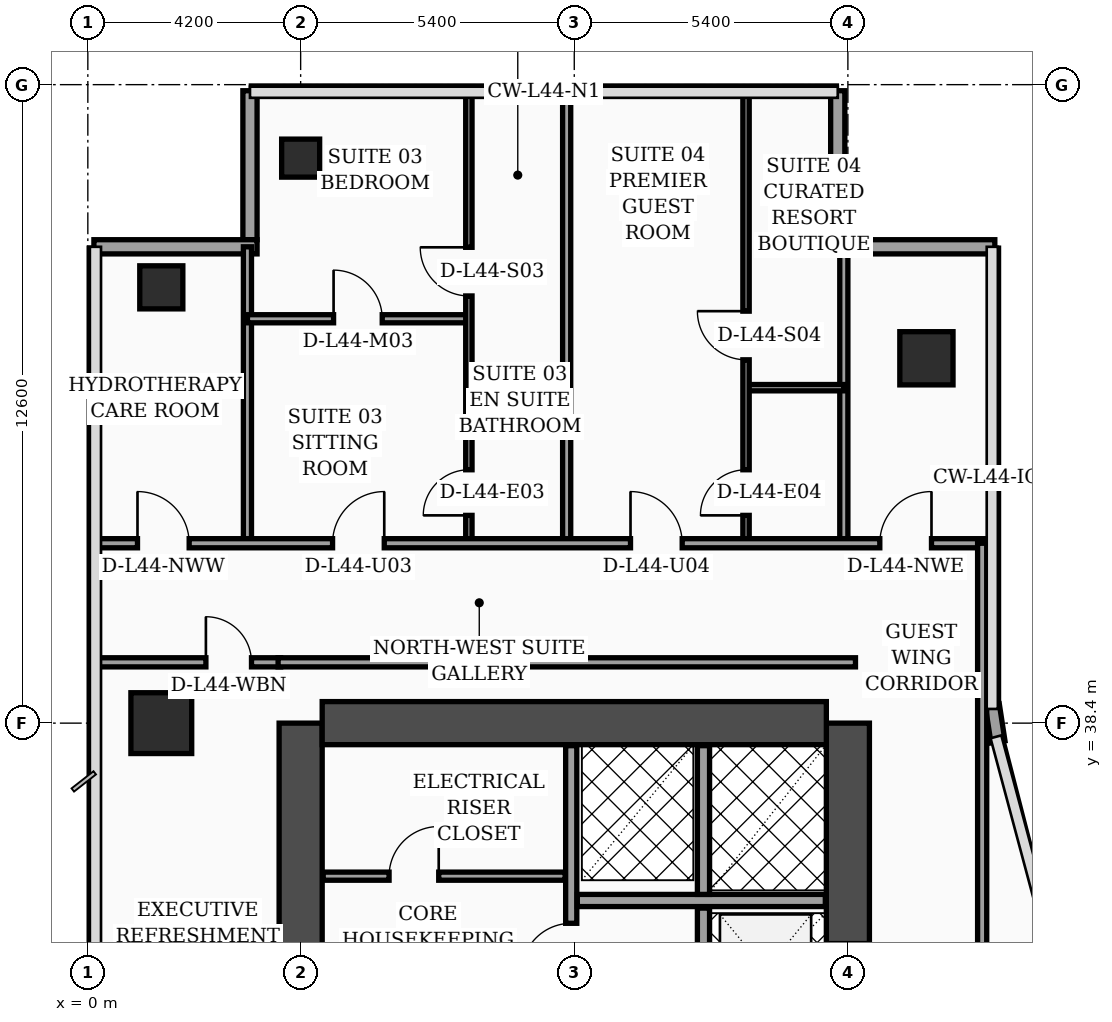
"""IFC4 building model, lengths in metres.
Left out: names, types, materials, properties, quantities, classifications, styles, units other than length and angle.
Written with IfcOpenShell. Run it as: python <this file> out.ifc"""

import sys

from ifc_helpers import new_model, si_unit, direction, frame, frame_2d, origin, origin_2d, place, context, subcontext, project, spatial, rectangle, hollow_rectangle, extrude, element, fill, save


model = new_model("IFC4")
c1 = context("Model", 3, precision=1e-05, world=origin(), true_north=direction((0.0, 1.0)))
c2 = subcontext(c1, "Body", "Model", "MODEL_VIEW")
j1 = project(units=[si_unit("LENGTHUNIT", "METRE"), si_unit("PLANEANGLEUNIT", "RADIAN")], contexts=[c1])
p1 = place(None, origin())
s1 = spatial("IfcSite", under=j1, at=p1, CompositionType="ELEMENT")
p2 = place(p1, origin())
s2 = spatial("IfcBuilding", under=s1, at=p2, CompositionType="ELEMENT")
p3 = place(p2, frame((0.0, 0.0, 178.9)))
s3 = spatial("IfcBuildingStorey", under=s2, at=p3, CompositionType="ELEMENT", Elevation=178.9)
p4 = place(p3, frame((4.2, 16.8, 0.0), z_axis=(0.0, 0.0, 1.0), x_axis=(0.0, 1.0, 0.0)))
e1 = element("IfcWall", 1, at=p4, inside=s3, PredefinedType="SHEAR", context=c2, shape_type="SweptSolid", body=[
    extrude(rectangle(XDim=21.6, YDim=0.85, at=frame_2d((10.8, 0.0))), origin(), (0.0, 0.0, 1.0), 3.56),
])
p5 = place(p3, frame((15.0, 16.8, 0.0), z_axis=(0.0, 0.0, 1.0), x_axis=(0.0, 1.0, 0.0)))
e2 = element("IfcWall", 2, at=p5, inside=s3, PredefinedType="SHEAR", context=c2, shape_type="SweptSolid", body=[
    extrude(rectangle(XDim=21.6, YDim=0.85, at=frame_2d((10.8, 0.0))), origin(), (0.0, 0.0, 1.0), 3.56),
])
p6 = place(p5, frame((8.65, 0.0, 0.0)))
e3 = element("IfcOpeningElement", 3, at=p6, cuts=e2, PredefinedType="OPENING", context=c2, shape_type="SweptSolid", body=[
    extrude(rectangle(XDim=1.1, YDim=2.2, at=frame_2d((0.55, 1.1))), frame((0.0, 0.435, 0.0), z_axis=(0.0, -1.0, 0.0), x_axis=(1.0, 0.0, 0.0)), (0.0, 0.0, 1.0), 0.87),
])
p7 = place(p5, frame((10.85, 0.0, 0.0)))
e4 = element("IfcOpeningElement", 4, at=p7, cuts=e2, PredefinedType="OPENING", context=c2, shape_type="SweptSolid", body=[
    extrude(rectangle(XDim=1.1, YDim=2.2, at=frame_2d((0.55, 1.1))), frame((0.0, 0.435, 0.0), z_axis=(0.0, -1.0, 0.0), x_axis=(1.0, 0.0, 0.0)), (0.0, 0.0, 1.0), 0.87),
])
p8 = place(p5, frame((13.5, 0.0, 0.0)))
e5 = element("IfcOpeningElement", 5, at=p8, cuts=e2, PredefinedType="OPENING", context=c2, shape_type="SweptSolid", body=[
    extrude(rectangle(XDim=1.1, YDim=2.2, at=frame_2d((0.55, 1.1))), frame((0.0, 0.435, 0.0), z_axis=(0.0, -1.0, 0.0), x_axis=(1.0, 0.0, 0.0)), (0.0, 0.0, 1.0), 0.87),
])
p9 = place(p5, frame((16.15, 0.0, 0.0)))
e6 = element("IfcOpeningElement", 6, at=p9, cuts=e2, PredefinedType="OPENING", context=c2, shape_type="SweptSolid", body=[
    extrude(rectangle(XDim=1.1, YDim=2.2, at=frame_2d((0.55, 1.1))), frame((0.0, 0.435, 0.0), z_axis=(0.0, -1.0, 0.0), x_axis=(1.0, 0.0, 0.0)), (0.0, 0.0, 1.0), 0.87),
])
p10 = place(p3, frame((4.625, 38.4, 0.0), z_axis=(0.0, 0.0, 1.0), x_axis=(1.0, 0.0, 0.0)))
e7 = element("IfcWall", 7, at=p10, inside=s3, PredefinedType="SHEAR", context=c2, shape_type="SweptSolid", body=[
    extrude(rectangle(XDim=9.95, YDim=0.85, at=frame_2d((4.975, 0.0))), origin(), (0.0, 0.0, 1.0), 3.56),
])
p11 = place(p3, frame((1.45, 38.4, 0.0), z_axis=(0.0, 0.0, 1.0), x_axis=(1.0, 0.0, 0.0)))
e8 = element("IfcColumn", 8, at=p11, inside=s3, PredefinedType="COLUMN", context=c2, shape_type="SweptSolid", body=[
    extrude(rectangle(XDim=1.2, YDim=1.2, at=origin_2d()), origin(), (0.0, 0.0, 1.0), 3.56),
])
p12 = place(p3, frame((1.45, 47.0, 0.0), z_axis=(0.0, 0.0, 1.0), x_axis=(1.0, 0.0, 0.0)))
e9 = element("IfcColumn", 9, at=p12, inside=s3, PredefinedType="COLUMN", context=c2, shape_type="SweptSolid", body=[
    extrude(hollow_rectangle(XDim=0.85, YDim=0.85, WallThickness=0.036, at=origin_2d()), origin(), (0.0, 0.0, 1.0), 3.56),
])
p13 = place(p3, frame((4.2, 49.55, 0.0), z_axis=(0.0, 0.0, 1.0), x_axis=(1.0, 0.0, 0.0)))
e10 = element("IfcColumn", 10, at=p13, inside=s3, PredefinedType="COLUMN", context=c2, shape_type="SweptSolid", body=[
    extrude(hollow_rectangle(XDim=0.75, YDim=0.75, WallThickness=0.032, at=origin_2d()), origin(), (0.0, 0.0, 1.0), 3.56),
])
p14 = place(p3, frame((16.55, 45.6, 0.0), z_axis=(0.0, 0.0, 1.0), x_axis=(1.0, 0.0, 0.0)))
e11 = element("IfcColumn", 11, at=p14, inside=s3, PredefinedType="COLUMN", context=c2, shape_type="SweptSolid", body=[
    extrude(rectangle(XDim=1.05, YDim=1.05, at=origin_2d()), origin(), (0.0, 0.0, 1.0), 3.56),
])
p15 = place(p3, frame((17.962, 38.03, 0.0), z_axis=(0.0, 0.0, 1.0), x_axis=(-0.15141125477, 0.988470855377, 0.0)))
e12 = element("IfcWall", 12, at=p15, inside=s3, PredefinedType="SOLIDWALL", context=c2, shape_type="SweptSolid", body=[
    extrude(rectangle(XDim=0.739, YDim=0.28, at=frame_2d((0.369, 0.0))), origin(), (0.0, 0.0, 1.0), 3.56),
])
p16 = place(p3, frame((17.9, 47.8, 0.0), z_axis=(0.0, 0.0, 1.0), x_axis=(-1.0, 0.0, 0.0)))
e13 = element("IfcWall", 13, at=p16, inside=s3, PredefinedType="SOLIDWALL", context=c2, shape_type="SweptSolid", body=[
    extrude(rectangle(XDim=3.24, YDim=0.28, at=frame_2d((1.62, 0.0))), origin(), (0.0, 0.0, 1.0), 3.56),
])
p17 = place(p3, frame((14.8, 47.94, 0.0), z_axis=(0.0, 0.0, 1.0), x_axis=(0.0, 1.0, 0.0)))
e14 = element("IfcWall", 14, at=p17, inside=s3, PredefinedType="SOLIDWALL", context=c2, shape_type="SweptSolid", body=[
    extrude(rectangle(XDim=2.94, YDim=0.28, at=frame_2d((1.47, 0.0))), origin(), (0.0, 0.0, 1.0), 3.56),
])
p18 = place(p3, frame((3.2, 50.88, 0.0), z_axis=(0.0, 0.0, 1.0), x_axis=(0.0, -1.0, 0.0)))
e15 = element("IfcWall", 15, at=p18, inside=s3, PredefinedType="SOLIDWALL", context=c2, shape_type="SweptSolid", body=[
    extrude(rectangle(XDim=2.94, YDim=0.28, at=frame_2d((1.47, 0.0))), origin(), (0.0, 0.0, 1.0), 3.04),
])
p19 = place(p3, frame((3.34, 47.8, 0.0), z_axis=(0.0, 0.0, 1.0), x_axis=(-1.0, 0.0, 0.0)))
e16 = element("IfcWall", 16, at=p19, inside=s3, PredefinedType="SOLIDWALL", context=c2, shape_type="SweptSolid", body=[
    extrude(rectangle(XDim=3.22, YDim=0.28, at=frame_2d((1.61, 0.0))), origin(), (0.0, 0.0, 1.0), 3.04),
])
p20 = place(p3, frame((4.645, 35.38, 0.0), z_axis=(0.0, 0.0, 1.0), x_axis=(1.0, 0.0, 0.0)))
e17 = element("IfcWall", 17, at=p20, inside=s3, PredefinedType="PARTITIONING", context=c2, shape_type="SweptSolid", body=[
    extrude(rectangle(XDim=4.775, YDim=0.16, at=frame_2d((2.387, 0.0))), origin(), (0.0, 0.0, 1.0), 3.56),
])
p21 = place(p20, frame((1.3, 0.0, 0.0)))
e18 = element("IfcOpeningElement", 18, at=p21, cuts=e17, PredefinedType="OPENING", context=c2, shape_type="SweptSolid", body=[
    extrude(rectangle(XDim=0.98, YDim=2.15, at=frame_2d((0.49, 1.075))), frame((0.0, 0.09, 0.0), z_axis=(0.0, -1.0, 0.0), x_axis=(1.0, 0.0, 0.0)), (0.0, 0.0, 1.0), 0.18),
])
p22 = place(p3, frame((9.54, 32.92, 0.0), z_axis=(0.0, 0.0, 1.0), x_axis=(0.0, 1.0, 0.0)))
e19 = element("IfcWall", 19, at=p22, inside=s3, PredefinedType="SOLIDWALL", context=c2, shape_type="SweptSolid", body=[
    extrude(rectangle(XDim=5.035, YDim=0.22, at=frame_2d((2.518, 0.0))), origin(), (0.0, 0.0, 1.0), 3.56),
])
p23 = place(p22, frame((0.55, 0.0, 0.0)))
e20 = element("IfcOpeningElement", 20, at=p23, cuts=e19, PredefinedType="OPENING", context=c2, shape_type="SweptSolid", body=[
    extrude(rectangle(XDim=0.98, YDim=2.15, at=frame_2d((0.49, 1.075))), frame((0.0, 0.12, 0.0), z_axis=(0.0, -1.0, 0.0), x_axis=(1.0, 0.0, 0.0)), (0.0, 0.0, 1.0), 0.24),
])
p24 = place(p3, frame((12.15, 27.0, 0.0), z_axis=(0.0, 0.0, 1.0), x_axis=(0.0, 1.0, 0.0)))
e21 = element("IfcWall", 21, at=p24, inside=s3, PredefinedType="SOLIDWALL", context=c2, shape_type="SweptSolid", body=[
    extrude(rectangle(XDim=7.75, YDim=0.24, at=frame_2d((3.875, 0.0))), origin(), (0.0, 0.0, 1.0), 3.56),
])
p25 = place(p3, frame((9.66, 34.9, 0.0), z_axis=(0.0, 0.0, 1.0), x_axis=(1.0, 0.0, 0.0)))
e22 = element("IfcWall", 22, at=p25, inside=s3, PredefinedType="SOLIDWALL", context=c2, shape_type="SweptSolid", body=[
    extrude(rectangle(XDim=4.895, YDim=0.24, at=frame_2d((2.448, 0.0))), origin(), (0.0, 0.0, 1.0), 3.56),
])
p26 = place(p3, frame((12.15, 35.02, 0.0), z_axis=(0.0, 0.0, 1.0), x_axis=(0.0, 1.0, 0.0)))
e23 = element("IfcWall", 23, at=p26, inside=s3, PredefinedType="SOLIDWALL", context=c2, shape_type="SweptSolid", body=[
    extrude(rectangle(XDim=2.935, YDim=0.24, at=frame_2d((1.468, 0.0))), origin(), (0.0, 0.0, 1.0), 3.56),
])
p27 = place(p3, frame((0.08, 39.6, 0.0), z_axis=(0.0, 0.0, 1.0), x_axis=(1.0, 0.0, 0.0)))
e24 = element("IfcWall", 24, at=p27, inside=s3, PredefinedType="PARTITIONING", context=c2, shape_type="SweptSolid", body=[
    extrude(rectangle(XDim=3.725, YDim=0.18, at=frame_2d((1.862, 0.0))), origin(), (0.0, 0.0, 1.0), 2.94),
])
p28 = place(p27, frame((2.25, 0.0, 0.0)))
e25 = element("IfcOpeningElement", 25, at=p28, cuts=e24, PredefinedType="OPENING", context=c2, shape_type="SweptSolid", body=[
    extrude(rectangle(XDim=0.9, YDim=2.15, at=frame_2d((0.45, 1.075))), frame((0.0, 0.1, 0.0), z_axis=(0.0, -1.0, 0.0), x_axis=(1.0, 0.0, 0.0)), (0.0, 0.0, 1.0), 0.2),
])
p29 = place(p3, frame((3.15, 41.95, 0.0), z_axis=(0.0, 0.0, 1.0), x_axis=(0.0, 1.0, 0.0)))
e26 = element("IfcWall", 26, at=p29, inside=s3, PredefinedType="PARTITIONING", context=c2, shape_type="SweptSolid", body=[
    extrude(rectangle(XDim=5.85, YDim=0.16, at=frame_2d((2.925, 0.0))), origin(), (0.0, 0.0, 1.0), 3.14),
])
p30 = place(p3, frame((14.92, 41.95, 0.0), z_axis=(0.0, 0.0, 1.0), x_axis=(0.0, 1.0, 0.0)))
e27 = element("IfcWall", 27, at=p30, inside=s3, PredefinedType="PARTITIONING", context=c2, shape_type="SweptSolid", body=[
    extrude(rectangle(XDim=5.85, YDim=0.16, at=frame_2d((2.925, 0.0))), origin(), (0.0, 0.0, 1.0), 3.04),
])
p31 = place(p3, frame((7.52, 45.02, 0.0), z_axis=(0.0, 0.0, 1.0), x_axis=(1.0, 0.0, 0.0)))
e28 = element("IfcWall", 28, at=p31, inside=s3, PredefinedType="PARTITIONING", context=c2, shape_type="SweptSolid", body=[
    extrude(rectangle(XDim=1.93, YDim=0.125, at=frame_2d((0.965, 0.0))), origin(), (0.0, 0.0, 1.0), 3.56),
])
p32 = place(p3, frame((3.15, 46.38, 0.0), z_axis=(0.0, 0.0, 1.0), x_axis=(1.0, 0.0, 0.0)))
e29 = element("IfcWall", 29, at=p32, inside=s3, PredefinedType="PARTITIONING", context=c2, shape_type="SweptSolid", body=[
    extrude(rectangle(XDim=4.37, YDim=0.16, at=frame_2d((2.185, 0.0))), origin(), (0.0, 0.0, 1.0), 2.94),
])
p33 = place(p32, frame((1.7, 0.0, 0.0)))
e30 = element("IfcOpeningElement", 30, at=p33, cuts=e29, PredefinedType="OPENING", context=c2, shape_type="SweptSolid", body=[
    extrude(rectangle(XDim=0.96, YDim=2.2, at=frame_2d((0.48, 1.1))), frame((0.0, 0.09, 0.0), z_axis=(0.0, -1.0, 0.0), x_axis=(1.0, 0.0, 0.0)), (0.0, 0.0, 1.0), 0.18),
])
p34 = place(p3, frame((7.52, 41.95, 0.0), z_axis=(0.0, 0.0, 1.0), x_axis=(0.0, 1.0, 0.0)))
e31 = element("IfcWall", 31, at=p34, inside=s3, PredefinedType="PARTITIONING", context=c2, shape_type="SweptSolid", body=[
    extrude(rectangle(XDim=8.99, YDim=0.125, at=frame_2d((4.495, 0.0))), origin(), (0.0, 0.0, 1.0), 3.04),
])
p35 = place(p34, frame((0.55, 0.0, 0.0)))
e32 = element("IfcOpeningElement", 32, at=p35, cuts=e31, PredefinedType="OPENING", context=c2, shape_type="SweptSolid", body=[
    extrude(rectangle(XDim=0.9, YDim=2.15, at=frame_2d((0.45, 1.075))), frame((0.0, 0.073, 0.0), z_axis=(0.0, -1.0, 0.0), x_axis=(1.0, 0.0, 0.0)), (0.0, 0.0, 1.0), 0.145),
])
p36 = place(p34, frame((4.88, 0.0, 0.0)))
e33 = element("IfcOpeningElement", 33, at=p36, cuts=e31, PredefinedType="OPENING", context=c2, shape_type="SweptSolid", body=[
    extrude(rectangle(XDim=0.96, YDim=2.2, at=frame_2d((0.48, 1.1))), frame((0.0, 0.073, 0.0), z_axis=(0.0, -1.0, 0.0), x_axis=(1.0, 0.0, 0.0)), (0.0, 0.0, 1.0), 0.145),
])
p37 = place(p3, frame((12.99, 45.02, 0.0), z_axis=(0.0, 0.0, 1.0), x_axis=(1.0, 0.0, 0.0)))
e34 = element("IfcWall", 34, at=p37, inside=s3, PredefinedType="PARTITIONING", context=c2, shape_type="SweptSolid", body=[
    extrude(rectangle(XDim=1.93, YDim=0.125, at=frame_2d((0.965, 0.0))), origin(), (0.0, 0.0, 1.0), 3.56),
])
p38 = place(p3, frame((12.99, 41.95, 0.0), z_axis=(0.0, 0.0, 1.0), x_axis=(0.0, 1.0, 0.0)))
e35 = element("IfcWall", 35, at=p38, inside=s3, PredefinedType="PARTITIONING", context=c2, shape_type="SweptSolid", body=[
    extrude(rectangle(XDim=8.99, YDim=0.125, at=frame_2d((4.495, 0.0))), origin(), (0.0, 0.0, 1.0), 3.04),
])
p39 = place(p38, frame((0.55, 0.0, 0.0)))
e36 = element("IfcOpeningElement", 36, at=p39, cuts=e35, PredefinedType="OPENING", context=c2, shape_type="SweptSolid", body=[
    extrude(rectangle(XDim=0.9, YDim=2.15, at=frame_2d((0.45, 1.075))), frame((0.0, 0.073, 0.0), z_axis=(0.0, -1.0, 0.0), x_axis=(1.0, 0.0, 0.0)), (0.0, 0.0, 1.0), 0.145),
])
p40 = place(p38, frame((3.62, 0.0, 0.0)))
e37 = element("IfcOpeningElement", 37, at=p40, cuts=e35, PredefinedType="OPENING", context=c2, shape_type="SweptSolid", body=[
    extrude(rectangle(XDim=0.96, YDim=2.2, at=frame_2d((0.48, 1.1))), frame((0.0, 0.073, 0.0), z_axis=(0.0, -1.0, 0.0), x_axis=(1.0, 0.0, 0.0)), (0.0, 0.0, 1.0), 0.145),
])
p41 = place(p3, frame((9.45, 41.95, 0.0), z_axis=(0.0, 0.0, 1.0), x_axis=(0.0, 1.0, 0.0)))
e38 = element("IfcWall", 38, at=p41, inside=s3, PredefinedType="PARTITIONING", context=c2, shape_type="SweptSolid", body=[
    extrude(rectangle(XDim=8.99, YDim=0.16, at=frame_2d((4.495, 0.0))), origin(), (0.0, 0.0, 1.0), 3.04),
])
p42 = place(p3, frame((0.08, 41.95, 0.0), z_axis=(0.0, 0.0, 1.0), x_axis=(1.0, 0.0, 0.0)))
e39 = element("IfcWall", 39, at=p42, inside=s3, PredefinedType="PARTITIONING", context=c2, shape_type="SweptSolid", body=[
    extrude(rectangle(XDim=17.77, YDim=0.18, at=frame_2d((8.885, 0.0))), origin(), (0.0, 0.0, 1.0), 2.94),
])
p43 = place(p42, frame((0.9, 0.0, 0.0)))
e40 = element("IfcOpeningElement", 40, at=p43, cuts=e39, PredefinedType="OPENING", context=c2, shape_type="SweptSolid", body=[
    extrude(rectangle(XDim=1.02, YDim=2.2, at=frame_2d((0.51, 1.1))), frame((0.0, 0.1, 0.0), z_axis=(0.0, -1.0, 0.0), x_axis=(1.0, 0.0, 0.0)), (0.0, 0.0, 1.0), 0.2),
])
p44 = place(p42, frame((4.75, 0.0, 0.0)))
e41 = element("IfcOpeningElement", 41, at=p44, cuts=e39, PredefinedType="OPENING", context=c2, shape_type="SweptSolid", body=[
    extrude(rectangle(XDim=1.02, YDim=2.2, at=frame_2d((0.51, 1.1))), frame((0.0, 0.1, 0.0), z_axis=(0.0, -1.0, 0.0), x_axis=(1.0, 0.0, 0.0)), (0.0, 0.0, 1.0), 0.2),
])
p45 = place(p42, frame((10.63, 0.0, 0.0)))
e42 = element("IfcOpeningElement", 42, at=p45, cuts=e39, PredefinedType="OPENING", context=c2, shape_type="SweptSolid", body=[
    extrude(rectangle(XDim=1.02, YDim=2.2, at=frame_2d((0.51, 1.1))), frame((0.0, 0.1, 0.0), z_axis=(0.0, -1.0, 0.0), x_axis=(1.0, 0.0, 0.0)), (0.0, 0.0, 1.0), 0.2),
])
p46 = place(p42, frame((15.55, 0.0, 0.0)))
e43 = element("IfcOpeningElement", 43, at=p46, cuts=e39, PredefinedType="OPENING", context=c2, shape_type="SweptSolid", body=[
    extrude(rectangle(XDim=1.02, YDim=2.2, at=frame_2d((0.51, 1.1))), frame((0.0, 0.1, 0.0), z_axis=(0.0, -1.0, 0.0), x_axis=(1.0, 0.0, 0.0)), (0.0, 0.0, 1.0), 0.2),
])
p47 = place(p3, frame((17.65, 24.3, 0.0), z_axis=(0.0, 0.0, 1.0), x_axis=(0.0, 1.0, 0.0)))
e44 = element("IfcWall", 44, at=p47, inside=s3, PredefinedType="PARTITIONING", context=c2, shape_type="SweptSolid", body=[
    extrude(rectangle(XDim=17.65, YDim=0.18, at=frame_2d((8.825, 0.0))), origin(), (0.0, 0.0, 1.0), 2.94),
])
p48 = place(p3, frame((3.755, 39.6, 0.0), z_axis=(0.0, 0.0, 1.0), x_axis=(1.0, 0.0, 0.0)))
e45 = element("IfcWall", 45, at=p48, inside=s3, PredefinedType="PARTITIONING", context=c2, shape_type="SweptSolid", body=[
    extrude(rectangle(XDim=11.395, YDim=0.18, at=frame_2d((5.698, 0.0))), origin(), (0.0, 0.0, 1.0), 2.94),
])
p49 = place(p21, origin())
e46 = element("IfcDoor", 46, at=p49, inside=s3, OperationType="SINGLE_SWING_RIGHT", PredefinedType="DOOR", context=c2, shape_type="SweptSolid", body=[
    extrude(rectangle(XDim=0.98, YDim=2.15, at=frame_2d((0.49, 1.075))), frame((0.0, 0.025, 0.0), z_axis=(0.0, -1.0, 0.0), x_axis=(1.0, 0.0, 0.0)), (0.0, 0.0, 1.0), 0.05),
])
fill(e18, e46)
p50 = place(p23, origin())
e47 = element("IfcDoor", 47, at=p50, inside=s3, OperationType="SINGLE_SWING_LEFT", PredefinedType="DOOR", context=c2, shape_type="SweptSolid", body=[
    extrude(rectangle(XDim=0.98, YDim=2.15, at=frame_2d((0.49, 1.075))), frame((0.0, 0.025, 0.0), z_axis=(0.0, -1.0, 0.0), x_axis=(1.0, 0.0, 0.0)), (0.0, 0.0, 1.0), 0.05),
])
fill(e20, e47)
p51 = place(p28, origin())
e48 = element("IfcDoor", 48, at=p51, inside=s3, OperationType="SINGLE_SWING_LEFT", PredefinedType="DOOR", context=c2, shape_type="SweptSolid", body=[
    extrude(rectangle(XDim=0.9, YDim=2.15, at=frame_2d((0.45, 1.075))), frame((0.0, 0.025, 0.0), z_axis=(0.0, -1.0, 0.0), x_axis=(1.0, 0.0, 0.0)), (0.0, 0.0, 1.0), 0.05),
])
fill(e25, e48)
p52 = place(p33, origin())
e49 = element("IfcDoor", 49, at=p52, inside=s3, OperationType="SINGLE_SWING_LEFT", PredefinedType="DOOR", context=c2, shape_type="SweptSolid", body=[
    extrude(rectangle(XDim=0.96, YDim=2.2, at=frame_2d((0.48, 1.1))), frame((0.0, 0.025, 0.0), z_axis=(0.0, -1.0, 0.0), x_axis=(1.0, 0.0, 0.0)), (0.0, 0.0, 1.0), 0.05),
])
fill(e30, e49)
p53 = place(p35, origin())
e50 = element("IfcDoor", 50, at=p53, inside=s3, OperationType="SINGLE_SWING_LEFT", PredefinedType="DOOR", context=c2, shape_type="SweptSolid", body=[
    extrude(rectangle(XDim=0.9, YDim=2.15, at=frame_2d((0.45, 1.075))), frame((0.0, 0.025, 0.0), z_axis=(0.0, -1.0, 0.0), x_axis=(1.0, 0.0, 0.0)), (0.0, 0.0, 1.0), 0.05),
])
fill(e32, e50)
p54 = place(p36, origin())
e51 = element("IfcDoor", 51, at=p54, inside=s3, OperationType="SINGLE_SWING_RIGHT", PredefinedType="DOOR", context=c2, shape_type="SweptSolid", body=[
    extrude(rectangle(XDim=0.96, YDim=2.2, at=frame_2d((0.48, 1.1))), frame((0.0, 0.025, 0.0), z_axis=(0.0, -1.0, 0.0), x_axis=(1.0, 0.0, 0.0)), (0.0, 0.0, 1.0), 0.05),
])
fill(e33, e51)
p55 = place(p39, origin())
e52 = element("IfcDoor", 52, at=p55, inside=s3, OperationType="SINGLE_SWING_LEFT", PredefinedType="DOOR", context=c2, shape_type="SweptSolid", body=[
    extrude(rectangle(XDim=0.9, YDim=2.15, at=frame_2d((0.45, 1.075))), frame((0.0, 0.025, 0.0), z_axis=(0.0, -1.0, 0.0), x_axis=(1.0, 0.0, 0.0)), (0.0, 0.0, 1.0), 0.05),
])
fill(e36, e52)
p56 = place(p40, origin())
e53 = element("IfcDoor", 53, at=p56, inside=s3, OperationType="SINGLE_SWING_RIGHT", PredefinedType="DOOR", context=c2, shape_type="SweptSolid", body=[
    extrude(rectangle(XDim=0.96, YDim=2.2, at=frame_2d((0.48, 1.1))), frame((0.0, 0.025, 0.0), z_axis=(0.0, -1.0, 0.0), x_axis=(1.0, 0.0, 0.0)), (0.0, 0.0, 1.0), 0.05),
])
fill(e37, e53)
p57 = place(p43, origin())
e54 = element("IfcDoor", 54, at=p57, inside=s3, OperationType="SINGLE_SWING_LEFT", PredefinedType="DOOR", context=c2, shape_type="SweptSolid", body=[
    extrude(rectangle(XDim=1.02, YDim=2.2, at=frame_2d((0.51, 1.1))), frame((0.0, 0.025, 0.0), z_axis=(0.0, -1.0, 0.0), x_axis=(1.0, 0.0, 0.0)), (0.0, 0.0, 1.0), 0.05),
])
fill(e40, e54)
p58 = place(p44, origin())
e55 = element("IfcDoor", 55, at=p58, inside=s3, OperationType="SINGLE_SWING_RIGHT", PredefinedType="DOOR", context=c2, shape_type="SweptSolid", body=[
    extrude(rectangle(XDim=1.02, YDim=2.2, at=frame_2d((0.51, 1.1))), frame((0.0, 0.025, 0.0), z_axis=(0.0, -1.0, 0.0), x_axis=(1.0, 0.0, 0.0)), (0.0, 0.0, 1.0), 0.05),
])
fill(e41, e55)
p59 = place(p45, origin())
e56 = element("IfcDoor", 56, at=p59, inside=s3, OperationType="SINGLE_SWING_LEFT", PredefinedType="DOOR", context=c2, shape_type="SweptSolid", body=[
    extrude(rectangle(XDim=1.02, YDim=2.2, at=frame_2d((0.51, 1.1))), frame((0.0, 0.025, 0.0), z_axis=(0.0, -1.0, 0.0), x_axis=(1.0, 0.0, 0.0)), (0.0, 0.0, 1.0), 0.05),
])
fill(e42, e56)
p60 = place(p46, origin())
e57 = element("IfcDoor", 57, at=p60, inside=s3, OperationType="SINGLE_SWING_RIGHT", PredefinedType="DOOR", context=c2, shape_type="SweptSolid", body=[
    extrude(rectangle(XDim=1.02, YDim=2.2, at=frame_2d((0.51, 1.1))), frame((0.0, 0.025, 0.0), z_axis=(0.0, -1.0, 0.0), x_axis=(1.0, 0.0, 0.0)), (0.0, 0.0, 1.0), 0.05),
])
fill(e43, e57)
save(model, sys.argv[1])
